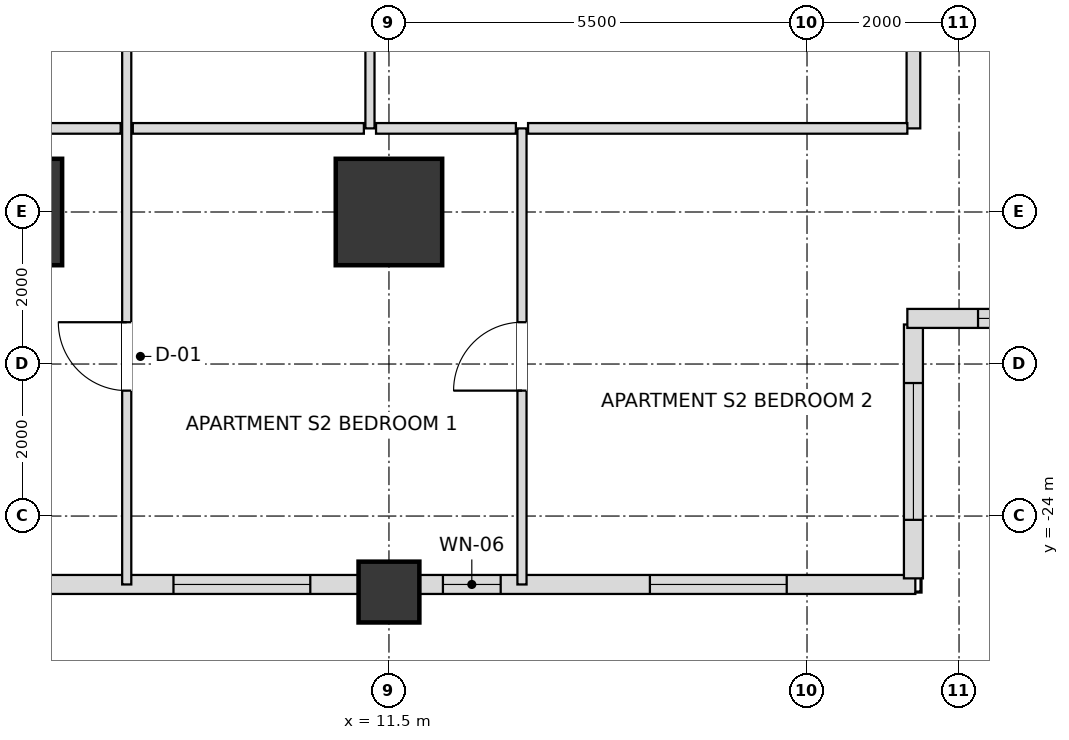
"""IFC4 building model, lengths in metres.
Left out: names, types, materials, properties, quantities, classifications, styles, units other than length and angle.
Written with IfcOpenShell. Run it as: python <this file> out.ifc"""

import sys

from ifc_helpers import new_model, si_unit, direction, frame, frame_2d, origin, origin_2d, place, context, subcontext, project, spatial, rectangle, extrude, element, fill, save


model = new_model("IFC4")
c1 = context("Model", 3, precision=1e-05, world=origin(), true_north=direction((0.0, 1.0)))
c2 = subcontext(c1, "Body", "Model", "MODEL_VIEW")
j1 = project(units=[si_unit("LENGTHUNIT", "METRE"), si_unit("PLANEANGLEUNIT", "RADIAN")], contexts=[c1])
p1 = place(None, origin())
s1 = spatial("IfcSite", under=j1, at=p1, CompositionType="ELEMENT")
p2 = place(p1, origin())
s2 = spatial("IfcBuilding", under=s1, at=p2, CompositionType="ELEMENT")
p3 = place(p2, frame((0.0, 0.0, 54.0)))
s3 = spatial("IfcBuildingStorey", under=s2, at=p3, CompositionType="ELEMENT", Elevation=54.0)
for number, where, z_axis, x_axis in (
    (1, (6.5, -20.0, 0.0), (0.0, 0.0, 1.0), (1.0, 0.0, 0.0)),
    (2, (11.5, -20.0, 0.0), (0.0, 0.0, 1.0), (1.0, 0.0, 0.0)),
):
    element("IfcColumn", number, at=place(p3, frame(where, z_axis=z_axis, x_axis=x_axis)), inside=s3, PredefinedType="USERDEFINED", context=c2, shape_type="SweptSolid", body=[
        extrude(rectangle(XDim=1.4, YDim=1.4, at=origin_2d()), origin(), (0.0, 0.0, 1.0), 3.6),
    ])
p4 = place(p3, frame((11.5, -25.0, 0.0), z_axis=(0.0, 0.0, 1.0), x_axis=(1.0, 0.0, 0.0)))
e3 = element("IfcColumn", 3, at=p4, inside=s3, PredefinedType="COLUMN", context=c2, shape_type="SweptSolid", body=[
    extrude(rectangle(XDim=0.8, YDim=0.8, at=origin_2d()), origin(), (0.0, 0.0, 1.0), 3.6),
])
p5 = place(p3, frame((6.895, -24.9, 0.0), z_axis=(0.0, 0.0, 1.0), x_axis=(1.0, 0.0, 0.0)))
e4 = element("IfcWall", 4, at=p5, inside=s3, PredefinedType="SOLIDWALL", context=c2, shape_type="SweptSolid", body=[
    extrude(rectangle(XDim=4.21, YDim=0.25, at=frame_2d((2.105, 0.0))), origin(), (0.0, 0.0, 1.0), 2.736),
])
p6 = place(p5, frame((1.77, 0.0, 0.72)))
e5 = element("IfcOpeningElement", 5, at=p6, cuts=e4, PredefinedType="OPENING", context=c2, shape_type="SweptSolid", body=[
    extrude(rectangle(XDim=1.8, YDim=1.68, at=frame_2d((0.9, 0.84))), frame((0.0, 0.135, 0.0), z_axis=(0.0, -1.0, 0.0), x_axis=(1.0, 0.0, 0.0)), (0.0, 0.0, 1.0), 0.27),
])
p7 = place(p3, frame((11.895, -24.9, 0.0), z_axis=(0.0, 0.0, 1.0), x_axis=(1.0, 0.0, 0.0)))
e6 = element("IfcWall", 6, at=p7, inside=s3, PredefinedType="SOLIDWALL", context=c2, shape_type="SweptSolid", body=[
    extrude(rectangle(XDim=6.53, YDim=0.25, at=frame_2d((3.265, 0.0))), origin(), (0.0, 0.0, 1.0), 2.736),
])
p8 = place(p7, frame((0.315, 0.0, 0.72)))
e7 = element("IfcOpeningElement", 7, at=p8, cuts=e6, PredefinedType="OPENING", context=c2, shape_type="SweptSolid", body=[
    extrude(rectangle(XDim=0.76, YDim=1.68, at=frame_2d((0.38, 0.84))), frame((0.0, 0.135, 0.0), z_axis=(0.0, -1.0, 0.0), x_axis=(1.0, 0.0, 0.0)), (0.0, 0.0, 1.0), 0.27),
])
p9 = place(p7, frame((3.038, 0.0, 0.72)))
e8 = element("IfcOpeningElement", 8, at=p9, cuts=e6, PredefinedType="OPENING", context=c2, shape_type="SweptSolid", body=[
    extrude(rectangle(XDim=1.8, YDim=1.68, at=frame_2d((0.9, 0.84))), frame((0.0, 0.135, 0.0), z_axis=(0.0, -1.0, 0.0), x_axis=(1.0, 0.0, 0.0)), (0.0, 0.0, 1.0), 0.27),
])
p10 = place(p3, frame((18.4, -24.82, 0.0), z_axis=(0.0, 0.0, 1.0), x_axis=(0.0, 1.0, 0.0)))
e9 = element("IfcWall", 9, at=p10, inside=s3, PredefinedType="SOLIDWALL", context=c2, shape_type="SweptSolid", body=[
    extrude(rectangle(XDim=3.34, YDim=0.25, at=frame_2d((1.67, 0.0))), origin(), (0.0, 0.0, 1.0), 2.736),
])
p11 = place(p10, frame((0.77, 0.0, 0.72)))
e10 = element("IfcOpeningElement", 10, at=p11, cuts=e9, PredefinedType="OPENING", context=c2, shape_type="SweptSolid", body=[
    extrude(rectangle(XDim=1.8, YDim=1.68, at=frame_2d((0.9, 0.84))), frame((0.0, 0.135, 0.0), z_axis=(0.0, -1.0, 0.0), x_axis=(1.0, 0.0, 0.0)), (0.0, 0.0, 1.0), 0.27),
])
p12 = place(p3, frame((18.32, -21.4, 0.0), z_axis=(0.0, 0.0, 1.0), x_axis=(1.0, 0.0, 0.0)))
e11 = element("IfcWall", 11, at=p12, inside=s3, PredefinedType="SOLIDWALL", context=c2, shape_type="SweptSolid", body=[
    extrude(rectangle(XDim=3.66, YDim=0.25, at=frame_2d((1.83, 0.0))), origin(), (0.0, 0.0, 1.0), 2.736),
])
p13 = place(p12, frame((0.93, 0.0, 0.72)))
e12 = element("IfcOpeningElement", 12, at=p13, cuts=e11, PredefinedType="OPENING", context=c2, shape_type="SweptSolid", body=[
    extrude(rectangle(XDim=1.8, YDim=1.68, at=frame_2d((0.9, 0.84))), frame((0.0, 0.135, 0.0), z_axis=(0.0, -1.0, 0.0), x_axis=(1.0, 0.0, 0.0)), (0.0, 0.0, 1.0), 0.27),
])
p14 = place(p3, frame((8.05, -24.9, 0.0), z_axis=(0.0, 0.0, 1.0), x_axis=(0.0, 1.0, 0.0)))
e13 = element("IfcWall", 13, at=p14, inside=s3, PredefinedType="PARTITIONING", context=c2, shape_type="SweptSolid", body=[
    extrude(rectangle(XDim=15.6, YDim=0.12, at=frame_2d((7.8, 0.0))), origin(), (0.0, 0.0, 1.0), 2.816),
])
p15 = place(p14, frame((10.325, 0.0, 0.0)))
e14 = element("IfcOpeningElement", 14, at=p15, cuts=e13, PredefinedType="OPENING", context=c2, shape_type="SweptSolid", body=[
    extrude(rectangle(XDim=0.95, YDim=2.1, at=frame_2d((0.475, 1.05))), frame((0.0, 0.07, 0.0), z_axis=(0.0, -1.0, 0.0), x_axis=(1.0, 0.0, 0.0)), (0.0, 0.0, 1.0), 0.14),
])
p16 = place(p14, frame((2.55, 0.0, 0.0)))
e15 = element("IfcOpeningElement", 15, at=p16, cuts=e13, PredefinedType="OPENING", context=c2, shape_type="SweptSolid", body=[
    extrude(rectangle(XDim=0.9, YDim=2.1, at=frame_2d((0.45, 1.05))), frame((0.0, 0.07, 0.0), z_axis=(0.0, -1.0, 0.0), x_axis=(1.0, 0.0, 0.0)), (0.0, 0.0, 1.0), 0.14),
])
p17 = place(p3, frame((11.25, -18.9, 0.0), z_axis=(0.0, 0.0, 1.0), x_axis=(0.0, 1.0, 0.0)))
e16 = element("IfcWall", 16, at=p17, inside=s3, PredefinedType="PARTITIONING", context=c2, shape_type="SweptSolid", body=[
    extrude(rectangle(XDim=9.6, YDim=0.12, at=frame_2d((4.8, 0.0))), origin(), (0.0, 0.0, 1.0), 2.736),
])
p18 = place(p17, frame((4.325, 0.0, 0.0)))
e17 = element("IfcOpeningElement", 17, at=p18, cuts=e16, PredefinedType="OPENING", context=c2, shape_type="SweptSolid", body=[
    extrude(rectangle(XDim=0.95, YDim=2.1, at=frame_2d((0.475, 1.05))), frame((0.0, 0.07, 0.0), z_axis=(0.0, -1.0, 0.0), x_axis=(1.0, 0.0, 0.0)), (0.0, 0.0, 1.0), 0.14),
])
p19 = place(p3, frame((13.25, -24.9, 0.0), z_axis=(0.0, 0.0, 1.0), x_axis=(0.0, 1.0, 0.0)))
e18 = element("IfcWall", 18, at=p19, inside=s3, PredefinedType="PARTITIONING", context=c2, shape_type="SweptSolid", body=[
    extrude(rectangle(XDim=6.0, YDim=0.12, at=frame_2d((3.0, 0.0))), origin(), (0.0, 0.0, 1.0), 2.736),
])
p20 = place(p19, frame((2.55, 0.0, 0.0)))
e19 = element("IfcOpeningElement", 19, at=p20, cuts=e18, PredefinedType="OPENING", context=c2, shape_type="SweptSolid", body=[
    extrude(rectangle(XDim=0.9, YDim=2.1, at=frame_2d((0.45, 1.05))), frame((0.0, 0.07, 0.0), z_axis=(0.0, -1.0, 0.0), x_axis=(1.0, 0.0, 0.0)), (0.0, 0.0, 1.0), 0.14),
])
p21 = place(p3, frame((18.4, -18.9, 0.0), z_axis=(0.0, 0.0, 1.0), x_axis=(0.0, 1.0, 0.0)))
e20 = element("IfcWall", 20, at=p21, inside=s3, PredefinedType="PARTITIONING", context=c2, shape_type="SweptSolid", body=[
    extrude(rectangle(XDim=9.6, YDim=0.18, at=frame_2d((4.8, 0.0))), origin(), (0.0, 0.0, 1.0), 2.736),
])
p22 = place(p3, frame((3.93, -18.9, 0.0), z_axis=(0.0, 0.0, 1.0), x_axis=(1.0, 0.0, 0.0)))
e21 = element("IfcWall", 21, at=p22, inside=s3, PredefinedType="PARTITIONING", context=c2, shape_type="SweptSolid", body=[
    extrude(rectangle(XDim=4.04, YDim=0.14, at=frame_2d((2.02, 0.0))), origin(), (0.0, 0.0, 1.0), 2.816),
])
p23 = place(p22, frame((0.638, 0.0, 0.0)))
e22 = element("IfcOpeningElement", 22, at=p23, cuts=e21, PredefinedType="OPENING", context=c2, shape_type="SweptSolid", body=[
    extrude(rectangle(XDim=0.95, YDim=2.1, at=frame_2d((0.475, 1.05))), frame((0.0, 0.08, 0.0), z_axis=(0.0, -1.0, 0.0), x_axis=(1.0, 0.0, 0.0)), (0.0, 0.0, 1.0), 0.16),
])
p24 = place(p3, frame((8.13, -18.9, 0.0), z_axis=(0.0, 0.0, 1.0), x_axis=(1.0, 0.0, 0.0)))
e23 = element("IfcWall", 23, at=p24, inside=s3, PredefinedType="PARTITIONING", context=c2, shape_type="SweptSolid", body=[
    extrude(rectangle(XDim=3.04, YDim=0.14, at=frame_2d((1.52, 0.0))), origin(), (0.0, 0.0, 1.0), 3.38),
])
p25 = place(p3, frame((11.33, -18.9, 0.0), z_axis=(0.0, 0.0, 1.0), x_axis=(1.0, 0.0, 0.0)))
e24 = element("IfcWall", 24, at=p25, inside=s3, PredefinedType="PARTITIONING", context=c2, shape_type="SweptSolid", body=[
    extrude(rectangle(XDim=1.84, YDim=0.14, at=frame_2d((0.92, 0.0))), origin(), (0.0, 0.0, 1.0), 2.736),
])
p26 = place(p3, frame((13.33, -18.9, 0.0), z_axis=(0.0, 0.0, 1.0), x_axis=(1.0, 0.0, 0.0)))
e25 = element("IfcWall", 25, at=p26, inside=s3, PredefinedType="PARTITIONING", context=c2, shape_type="SweptSolid", body=[
    extrude(rectangle(XDim=4.99, YDim=0.14, at=frame_2d((2.495, 0.0))), origin(), (0.0, 0.0, 1.0), 2.736),
])
p27 = place(p6, origin())
e26 = element("IfcWindow", 26, at=p27, inside=s3, PartitioningType="SINGLE_PANEL", PredefinedType="WINDOW", context=c2, shape_type="SweptSolid", body=[
    extrude(rectangle(XDim=1.8, YDim=1.68, at=frame_2d((0.9, 0.84))), frame((0.0, 0.03, 0.0), z_axis=(0.0, -1.0, 0.0), x_axis=(1.0, 0.0, 0.0)), (0.0, 0.0, 1.0), 0.06),
])
fill(e5, e26)
p28 = place(p8, origin())
e27 = element("IfcWindow", 27, at=p28, inside=s3, PartitioningType="SINGLE_PANEL", PredefinedType="WINDOW", context=c2, shape_type="SweptSolid", body=[
    extrude(rectangle(XDim=0.76, YDim=1.68, at=frame_2d((0.38, 0.84))), frame((0.0, 0.03, 0.0), z_axis=(0.0, -1.0, 0.0), x_axis=(1.0, 0.0, 0.0)), (0.0, 0.0, 1.0), 0.06),
])
fill(e7, e27)
p29 = place(p9, origin())
e28 = element("IfcWindow", 28, at=p29, inside=s3, PartitioningType="SINGLE_PANEL", PredefinedType="WINDOW", context=c2, shape_type="SweptSolid", body=[
    extrude(rectangle(XDim=1.8, YDim=1.68, at=frame_2d((0.9, 0.84))), frame((0.0, 0.03, 0.0), z_axis=(0.0, -1.0, 0.0), x_axis=(1.0, 0.0, 0.0)), (0.0, 0.0, 1.0), 0.06),
])
fill(e8, e28)
p30 = place(p11, origin())
e29 = element("IfcWindow", 29, at=p30, inside=s3, PartitioningType="SINGLE_PANEL", PredefinedType="WINDOW", context=c2, shape_type="SweptSolid", body=[
    extrude(rectangle(XDim=1.8, YDim=1.68, at=frame_2d((0.9, 0.84))), frame((0.0, 0.03, 0.0), z_axis=(0.0, -1.0, 0.0), x_axis=(1.0, 0.0, 0.0)), (0.0, 0.0, 1.0), 0.06),
])
fill(e10, e29)
p31 = place(p13, origin())
e30 = element("IfcWindow", 30, at=p31, inside=s3, PartitioningType="SINGLE_PANEL", PredefinedType="WINDOW", context=c2, shape_type="SweptSolid", body=[
    extrude(rectangle(XDim=1.8, YDim=1.68, at=frame_2d((0.9, 0.84))), frame((0.0, 0.03, 0.0), z_axis=(0.0, -1.0, 0.0), x_axis=(1.0, 0.0, 0.0)), (0.0, 0.0, 1.0), 0.06),
])
fill(e12, e30)
p32 = place(p16, origin())
e31 = element("IfcDoor", 31, at=p32, inside=s3, OperationType="SINGLE_SWING_RIGHT", PredefinedType="DOOR", context=c2, shape_type="SweptSolid", body=[
    extrude(rectangle(XDim=0.9, YDim=2.1, at=frame_2d((0.45, 1.05))), frame((0.0, 0.025, 0.0), z_axis=(0.0, -1.0, 0.0), x_axis=(1.0, 0.0, 0.0)), (0.0, 0.0, 1.0), 0.05),
])
fill(e15, e31)
p33 = place(p20, origin())
e32 = element("IfcDoor", 32, at=p33, inside=s3, OperationType="SINGLE_SWING_LEFT", PredefinedType="DOOR", context=c2, shape_type="SweptSolid", body=[
    extrude(rectangle(XDim=0.9, YDim=2.1, at=frame_2d((0.45, 1.05))), frame((0.0, 0.025, 0.0), z_axis=(0.0, -1.0, 0.0), x_axis=(1.0, 0.0, 0.0)), (0.0, 0.0, 1.0), 0.05),
])
fill(e19, e32)
save(model, sys.argv[1])
